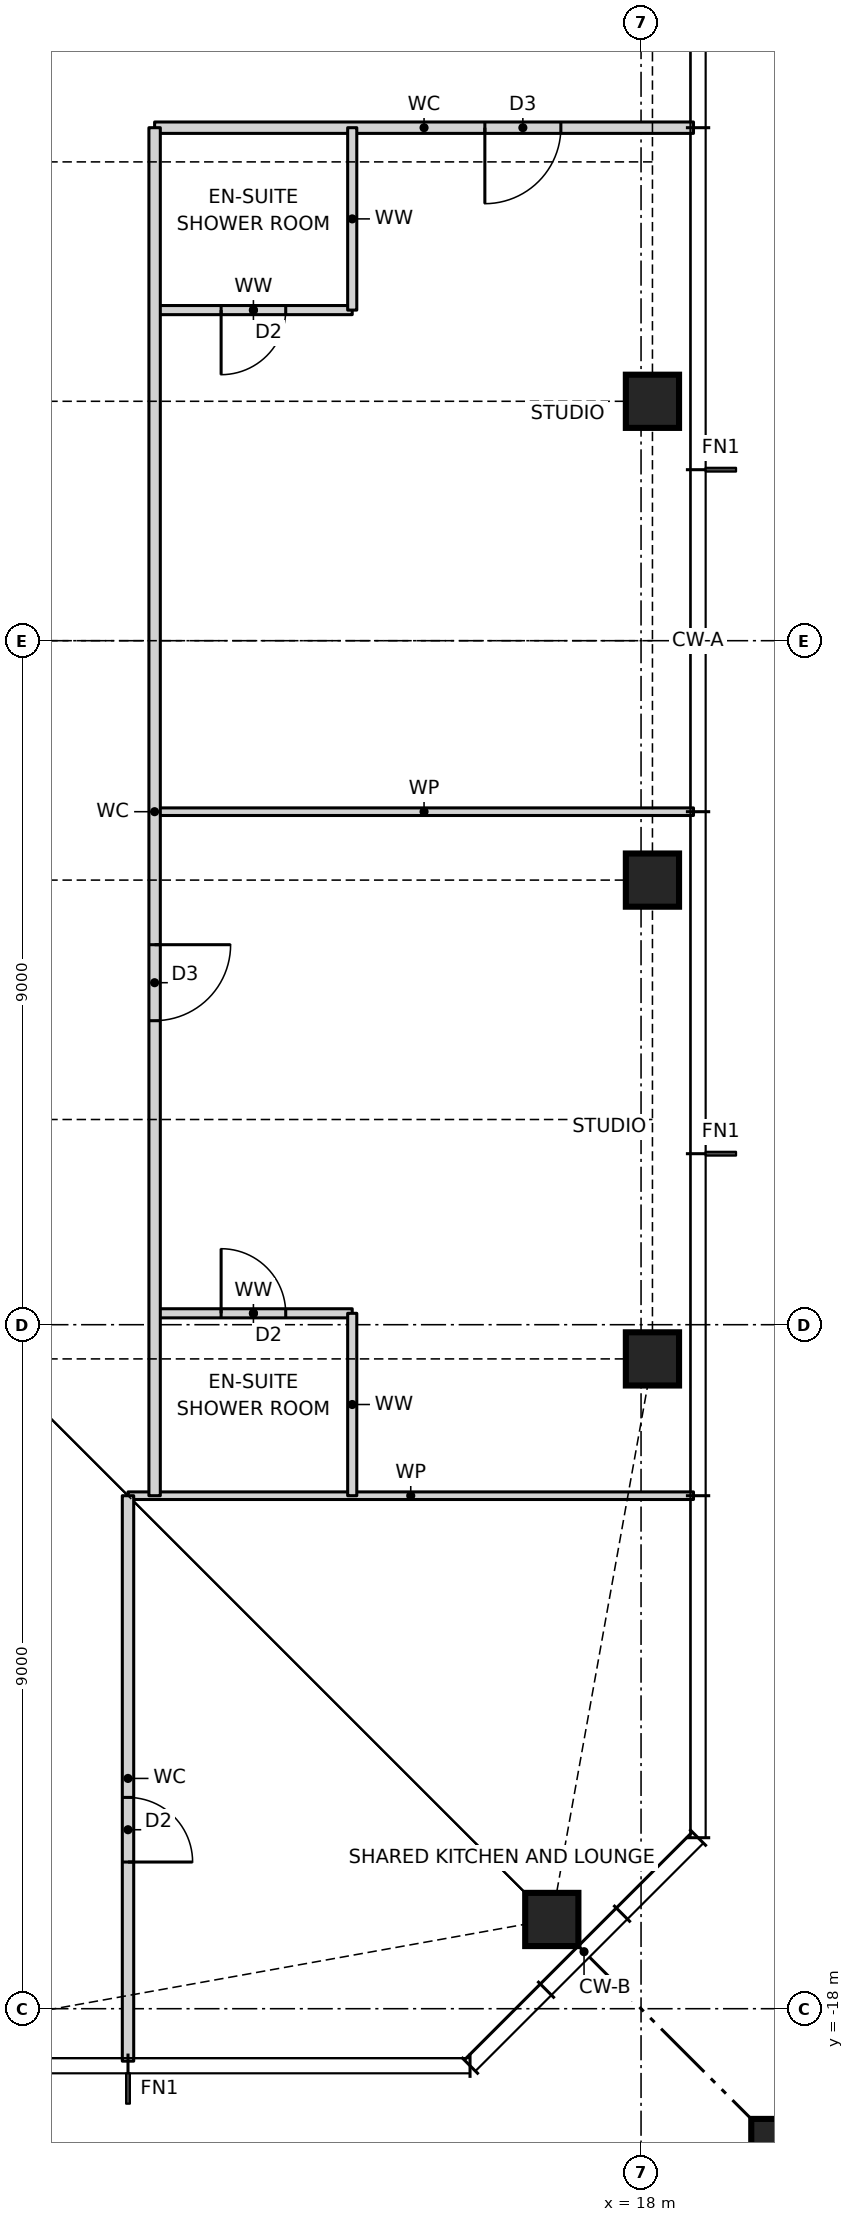
"""IFC4 building model, lengths in metres.
Left out: names, types, materials, properties, quantities, classifications, styles, units other than length and angle.
Written with IfcOpenShell. Run it as: python <this file> out.ifc"""

import sys

from ifc_helpers import new_model, si_unit, direction, frame, frame_2d, origin, origin_2d, place, context, subcontext, project, spatial, rectangle, hollow_rectangle, i_section, extrude, element, fill, save


model = new_model("IFC4")
c1 = context("Model", 3, precision=1e-05, world=origin(), true_north=direction((0.0, 1.0)))
c2 = subcontext(c1, "Body", "Model", "MODEL_VIEW")
j1 = project(units=[si_unit("LENGTHUNIT", "METRE"), si_unit("PLANEANGLEUNIT", "RADIAN")], contexts=[c1])
p1 = place(None, origin())
s1 = spatial("IfcSite", under=j1, at=p1, CompositionType="ELEMENT")
p2 = place(p1, origin())
s2 = spatial("IfcBuilding", under=s1, at=p2, CompositionType="ELEMENT")
p3 = place(p2, frame((0.0, 0.0, 198.5)))
s3 = spatial("IfcBuildingStorey", under=s2, at=p3, CompositionType="ELEMENT", Elevation=198.5)
for number, where, z_axis, x_axis in (
    (1, (16.826, -16.826, 0.0), (0.0, 0.0, 1.0), (1.0, 0.0, 0.0)),
    (2, (18.15, -9.45, 0.0), (0.0, 0.0, 1.0), (1.0, 0.0, 0.0)),
    (3, (18.15, -3.15, 0.0), (0.0, 0.0, 1.0), (1.0, 0.0, 0.0)),
    (4, (18.15, 3.15, 0.0), (0.0, 0.0, 1.0), (1.0, 0.0, 0.0)),
):
    element("IfcColumn", number, at=place(p3, frame(where, z_axis=z_axis, x_axis=x_axis)), inside=s3, PredefinedType="COLUMN", context=c2, shape_type="SweptSolid", body=[
        extrude(hollow_rectangle(XDim=0.7, YDim=0.7, WallThickness=0.06, at=origin_2d()), origin(), (0.0, 0.0, 1.0), 3.5),
    ])
p4 = place(p3, frame((21.65, -21.65, 0.0), z_axis=(0.0, 0.0, 1.0), x_axis=(1.0, 0.0, 0.0)))
e5 = element("IfcColumn", 5, at=p4, inside=s3, PredefinedType="COLUMN", context=c2, shape_type="SweptSolid", body=[
    extrude(rectangle(XDim=4.4, YDim=4.4, at=origin_2d()), origin(), (0.0, 0.0, 1.0), 3.5),
    extrude(i_section(OverallWidth=0.478, OverallDepth=0.599, WebThickness=0.1, FlangeThickness=0.14, at=origin_2d()), origin(), (0.0, 0.0, 1.0), 3.5),
])
p5 = place(p3, frame((11.25, -11.25, 0.0), z_axis=(0.0, 0.0, 1.0), x_axis=(1.0, 0.0, 0.0)))
e6 = element("IfcWall", 6, at=p5, inside=s3, PredefinedType="PARTITIONING", context=c2, shape_type="SweptSolid", body=[
    extrude(rectangle(XDim=7.44, YDim=0.1, at=frame_2d((3.72, 0.0))), origin(), (0.0, 0.0, 1.0), 3.27),
])
p6 = place(p3, frame((11.6, -8.85, 0.0), z_axis=(0.0, 0.0, 1.0), x_axis=(1.0, 0.0, 0.0)))
e7 = element("IfcWall", 7, at=p6, inside=s3, PredefinedType="PARTITIONING", context=c2, shape_type="SweptSolid", body=[
    extrude(rectangle(XDim=2.6, YDim=0.12, at=frame_2d((1.3, 0.0))), origin(), (0.0, 0.0, 1.0), 3.27),
])
p7 = place(p6, frame((0.875, 0.0, 0.0)))
e8 = element("IfcOpeningElement", 8, at=p7, cuts=e7, PredefinedType="OPENING", context=c2, shape_type="SweptSolid", body=[
    extrude(rectangle(XDim=0.85, YDim=2.1, at=frame_2d((0.425, 1.05))), frame((0.0, 0.07, 0.0), z_axis=(0.0, -1.0, 0.0), x_axis=(1.0, 0.0, 0.0)), (0.0, 0.0, 1.0), 0.14),
])
p8 = place(p3, frame((11.6, -2.25, 0.0), z_axis=(0.0, 0.0, 1.0), x_axis=(1.0, 0.0, 0.0)))
e9 = element("IfcWall", 9, at=p8, inside=s3, PredefinedType="PARTITIONING", context=c2, shape_type="SweptSolid", body=[
    extrude(rectangle(XDim=7.09, YDim=0.1, at=frame_2d((3.545, 0.0))), origin(), (0.0, 0.0, 1.0), 3.27),
])
p9 = place(p3, frame((11.6, 4.35, 0.0), z_axis=(0.0, 0.0, 1.0), x_axis=(1.0, 0.0, 0.0)))
e10 = element("IfcWall", 10, at=p9, inside=s3, PredefinedType="PARTITIONING", context=c2, shape_type="SweptSolid", body=[
    extrude(rectangle(XDim=2.6, YDim=0.12, at=frame_2d((1.3, 0.0))), origin(), (0.0, 0.0, 1.0), 3.27),
])
p10 = place(p9, frame((0.875, 0.0, 0.0)))
e11 = element("IfcOpeningElement", 11, at=p10, cuts=e10, PredefinedType="OPENING", context=c2, shape_type="SweptSolid", body=[
    extrude(rectangle(XDim=0.85, YDim=2.1, at=frame_2d((0.425, 1.05))), frame((0.0, 0.07, 0.0), z_axis=(0.0, -1.0, 0.0), x_axis=(1.0, 0.0, 0.0)), (0.0, 0.0, 1.0), 0.14),
])
p11 = place(p3, frame((11.6, 6.75, 0.0), z_axis=(0.0, 0.0, 1.0), x_axis=(1.0, 0.0, 0.0)))
e12 = element("IfcWall", 12, at=p11, inside=s3, PredefinedType="PARTITIONING", context=c2, shape_type="SweptSolid", body=[
    extrude(rectangle(XDim=7.09, YDim=0.15, at=frame_2d((3.545, 0.0))), origin(), (0.0, 0.0, 1.0), 3.27),
])
p12 = place(p11, frame((4.345, 0.0, 0.0)))
e13 = element("IfcOpeningElement", 13, at=p12, cuts=e12, PredefinedType="OPENING", context=c2, shape_type="SweptSolid", body=[
    extrude(rectangle(XDim=1.0, YDim=2.1, at=frame_2d((0.5, 1.05))), frame((0.0, 0.085, 0.0), z_axis=(0.0, -1.0, 0.0), x_axis=(1.0, 0.0, 0.0)), (0.0, 0.0, 1.0), 0.17),
])
for number, where, z_axis, x_axis in (
    (14, (14.2, -11.25, 0.0), (0.0, 0.0, 1.0), (0.0, 1.0, 0.0)),
    (15, (14.2, 4.35, 0.0), (0.0, 0.0, 1.0), (0.0, 1.0, 0.0)),
):
    element("IfcWall", number, at=place(p3, frame(where, z_axis=z_axis, x_axis=x_axis)), inside=s3, PredefinedType="PARTITIONING", context=c2, shape_type="SweptSolid", body=[
        extrude(rectangle(XDim=2.4, YDim=0.12, at=frame_2d((1.2, 0.0))), origin(), (0.0, 0.0, 1.0), 3.27),
    ])
p13 = place(p3, frame((11.6, -11.25, 0.0), z_axis=(0.0, 0.0, 1.0), x_axis=(0.0, 1.0, 0.0)))
e16 = element("IfcWall", 16, at=p13, inside=s3, PredefinedType="PARTITIONING", context=c2, shape_type="SweptSolid", body=[
    extrude(rectangle(XDim=18.0, YDim=0.15, at=frame_2d((9.0, 0.0))), origin(), (0.0, 0.0, 1.0), 3.27),
])
p14 = place(p13, frame((6.25, 0.0, 0.0)))
e17 = element("IfcOpeningElement", 17, at=p14, cuts=e16, PredefinedType="OPENING", context=c2, shape_type="SweptSolid", body=[
    extrude(rectangle(XDim=1.0, YDim=2.1, at=frame_2d((0.5, 1.05))), frame((0.0, 0.085, 0.0), z_axis=(0.0, -1.0, 0.0), x_axis=(1.0, 0.0, 0.0)), (0.0, 0.0, 1.0), 0.17),
])
p15 = place(p3, frame((11.25, -18.69, 0.0), z_axis=(0.0, 0.0, 1.0), x_axis=(0.0, 1.0, 0.0)))
e18 = element("IfcWall", 18, at=p15, inside=s3, PredefinedType="PARTITIONING", context=c2, shape_type="SweptSolid", body=[
    extrude(rectangle(XDim=7.44, YDim=0.15, at=frame_2d((3.72, 0.0))), origin(), (0.0, 0.0, 1.0), 3.27),
])
p16 = place(p15, frame((2.62, 0.0, 0.0)))
e19 = element("IfcOpeningElement", 19, at=p16, cuts=e18, PredefinedType="OPENING", context=c2, shape_type="SweptSolid", body=[
    extrude(rectangle(XDim=0.85, YDim=2.1, at=frame_2d((0.425, 1.05))), frame((0.0, 0.085, 0.0), z_axis=(0.0, -1.0, 0.0), x_axis=(1.0, 0.0, 0.0)), (0.0, 0.0, 1.0), 0.17),
])
p17 = place(p14, frame((1.0, 0.0, 0.0), z_axis=(0.0, 0.0, 1.0), x_axis=(-1.0, 0.0, 0.0)))
e20 = element("IfcDoor", 20, at=p17, inside=s3, OperationType="SINGLE_SWING_LEFT", PredefinedType="DOOR", context=c2, shape_type="SweptSolid", body=[
    extrude(rectangle(XDim=1.0, YDim=2.1, at=frame_2d((0.5, 1.05))), frame((0.0, 0.025, 0.0), z_axis=(0.0, -1.0, 0.0), x_axis=(1.0, 0.0, 0.0)), (0.0, 0.0, 1.0), 0.05),
])
fill(e17, e20)
p18 = place(p7, origin())
e21 = element("IfcDoor", 21, at=p18, inside=s3, OperationType="SINGLE_SWING_LEFT", PredefinedType="DOOR", context=c2, shape_type="SweptSolid", body=[
    extrude(rectangle(XDim=0.85, YDim=2.1, at=frame_2d((0.425, 1.05))), frame((0.0, 0.025, 0.0), z_axis=(0.0, -1.0, 0.0), x_axis=(1.0, 0.0, 0.0)), (0.0, 0.0, 1.0), 0.05),
])
fill(e8, e21)
p19 = place(p12, frame((1.0, 0.0, 0.0), z_axis=(0.0, 0.0, 1.0), x_axis=(-1.0, 0.0, 0.0)))
e22 = element("IfcDoor", 22, at=p19, inside=s3, OperationType="SINGLE_SWING_RIGHT", PredefinedType="DOOR", context=c2, shape_type="SweptSolid", body=[
    extrude(rectangle(XDim=1.0, YDim=2.1, at=frame_2d((0.5, 1.05))), frame((0.0, 0.025, 0.0), z_axis=(0.0, -1.0, 0.0), x_axis=(1.0, 0.0, 0.0)), (0.0, 0.0, 1.0), 0.05),
])
fill(e13, e22)
p20 = place(p10, frame((0.85, 0.0, 0.0), z_axis=(0.0, 0.0, 1.0), x_axis=(-1.0, 0.0, 0.0)))
e23 = element("IfcDoor", 23, at=p20, inside=s3, OperationType="SINGLE_SWING_RIGHT", PredefinedType="DOOR", context=c2, shape_type="SweptSolid", body=[
    extrude(rectangle(XDim=0.85, YDim=2.1, at=frame_2d((0.425, 1.05))), frame((0.0, 0.025, 0.0), z_axis=(0.0, -1.0, 0.0), x_axis=(1.0, 0.0, 0.0)), (0.0, 0.0, 1.0), 0.05),
])
fill(e11, e23)
p21 = place(p16, frame((0.85, 0.0, 0.0), z_axis=(0.0, 0.0, 1.0), x_axis=(-1.0, 0.0, 0.0)))
e24 = element("IfcDoor", 24, at=p21, inside=s3, OperationType="SINGLE_SWING_RIGHT", PredefinedType="DOOR", context=c2, shape_type="SweptSolid", body=[
    extrude(rectangle(XDim=0.85, YDim=2.1, at=frame_2d((0.425, 1.05))), frame((0.0, 0.025, 0.0), z_axis=(0.0, -1.0, 0.0), x_axis=(1.0, 0.0, 0.0)), (0.0, 0.0, 1.0), 0.05),
])
fill(e19, e24)
save(model, sys.argv[1])
